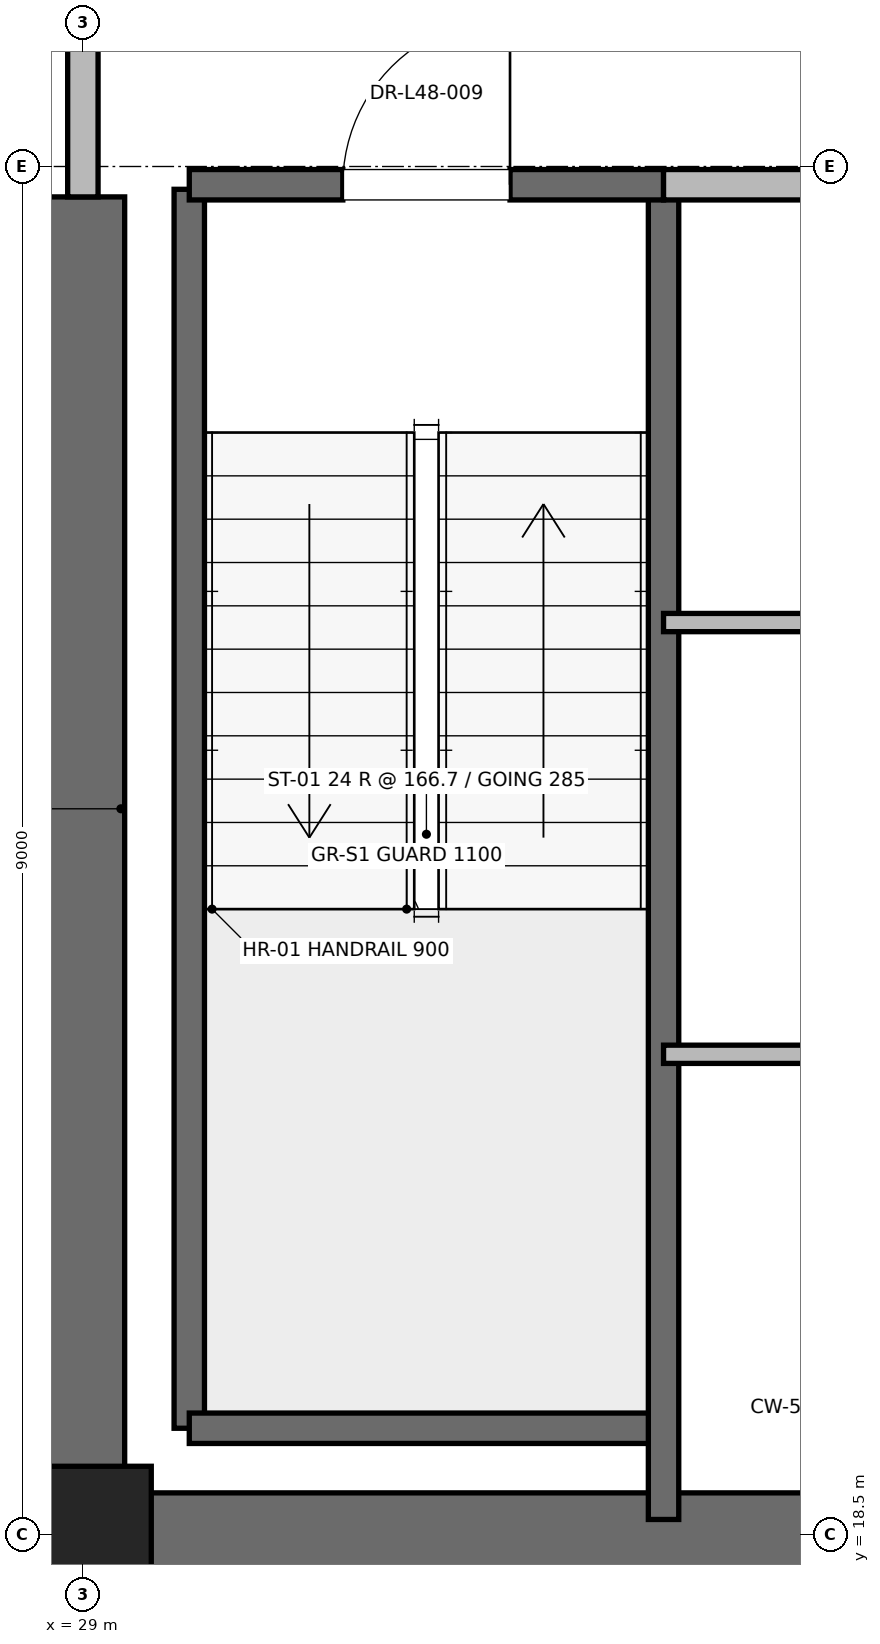
"""IFC4 building model, lengths in metres.
Left out: names, types, materials, properties, quantities, classifications, styles, units other than length and angle.
Written with IfcOpenShell. Run it as: python <this file> out.ifc"""

import sys

from ifc_helpers import new_model, si_unit, direction, frame, frame_2d, origin, origin_2d, place, context, subcontext, project, spatial, rectangle, extrude, element, fill, save


model = new_model("IFC4")
c1 = context("Model", 3, precision=1e-05, world=origin(), true_north=direction((0.0, 1.0)))
c2 = subcontext(c1, "Body", "Model", "MODEL_VIEW")
j1 = project(units=[si_unit("LENGTHUNIT", "METRE"), si_unit("PLANEANGLEUNIT", "RADIAN")], contexts=[c1])
p1 = place(None, origin())
s1 = spatial("IfcSite", under=j1, at=p1, CompositionType="ELEMENT")
p2 = place(p1, origin())
s2 = spatial("IfcBuilding", under=s1, at=p2, CompositionType="ELEMENT")
p3 = place(p2, frame((0.0, 0.0, 209.2)))
s3 = spatial("IfcBuildingStorey", under=s2, at=p3, CompositionType="ELEMENT", Elevation=209.2)
p4 = place(p3, frame((29.0, 18.5, 0.0), z_axis=(0.0, 0.0, 1.0), x_axis=(1.0, 0.0, 0.0)))
e1 = element("IfcColumn", 1, at=p4, inside=s3, PredefinedType="PILASTER", context=c2, shape_type="SweptSolid", body=[
    extrude(rectangle(XDim=0.9, YDim=0.9, at=origin_2d()), origin(), (0.0, 0.0, 1.0), 4.0),
])
p5 = place(p3, frame((29.0, 18.5, 0.0), z_axis=(0.0, 0.0, 1.0), x_axis=(1.0, 0.0, 0.0)))
e2 = element("IfcWall", 2, at=p5, inside=s3, PredefinedType="SHEAR", context=c2, shape_type="SweptSolid", body=[
    extrude(rectangle(XDim=9.2, YDim=0.55, at=frame_2d((4.6, 0.0))), origin(), (0.0, 0.0, 1.0), 3.775),
])
p6 = place(p3, frame((29.0, 18.5, 0.0), z_axis=(0.0, 0.0, 1.0), x_axis=(0.0, 1.0, 0.0)))
e3 = element("IfcWall", 3, at=p6, inside=s3, PredefinedType="SHEAR", context=c2, shape_type="SweptSolid", body=[
    extrude(rectangle(XDim=8.8, YDim=0.55, at=frame_2d((4.4, 0.0))), origin(), (0.0, 0.0, 1.0), 3.775),
])
p7 = place(p3, frame((29.7, 19.2, 0.0), z_axis=(0.0, 0.0, 1.0), x_axis=(0.0, 1.0, 0.0)))
e4 = element("IfcWall", 4, at=p7, inside=s3, PredefinedType="SOLIDWALL", context=c2, shape_type="SweptSolid", body=[
    extrude(rectangle(XDim=8.15, YDim=0.2, at=frame_2d((4.075, 0.0))), origin(), (0.0, 0.0, 1.0), 3.775),
])
p8 = place(p3, frame((29.7, 19.2, 0.0), z_axis=(0.0, 0.0, 1.0), x_axis=(1.0, 0.0, 0.0)))
e5 = element("IfcWall", 5, at=p8, inside=s3, PredefinedType="SOLIDWALL", context=c2, shape_type="SweptSolid", body=[
    extrude(rectangle(XDim=3.12, YDim=0.2, at=frame_2d((1.56, 0.0))), origin(), (0.0, 0.0, 1.0), 3.775),
])
p9 = place(p3, frame((32.82, 18.6, 0.0), z_axis=(0.0, 0.0, 1.0), x_axis=(0.0, 1.0, 0.0)))
e6 = element("IfcWall", 6, at=p9, inside=s3, PredefinedType="SOLIDWALL", context=c2, shape_type="SweptSolid", body=[
    extrude(rectangle(XDim=8.78, YDim=0.2, at=frame_2d((4.39, 0.0))), origin(), (0.0, 0.0, 1.0), 3.775),
])
p10 = place(p3, frame((29.7, 27.38, 0.0), z_axis=(0.0, 0.0, 1.0), x_axis=(1.0, 0.0, 0.0)))
e7 = element("IfcWall", 7, at=p10, inside=s3, PredefinedType="SOLIDWALL", context=c2, shape_type="SweptSolid", body=[
    extrude(rectangle(XDim=3.12, YDim=0.2, at=frame_2d((1.56, 0.0))), origin(), (0.0, 0.0, 1.0), 3.775),
])
p11 = place(p10, frame((1.01, 0.0, 0.0)))
e8 = element("IfcOpeningElement", 8, at=p11, cuts=e7, PredefinedType="OPENING", context=c2, shape_type="SweptSolid", body=[
    extrude(rectangle(XDim=1.1, YDim=2.15, at=frame_2d((0.55, 1.075))), frame((0.0, 0.1, 0.0), z_axis=(0.0, -1.0, 0.0), x_axis=(1.0, 0.0, 0.0)), (0.0, 0.0, 1.0), 0.2),
])
p12 = place(p3, frame((29.0, 27.3, 0.0), z_axis=(0.0, 0.0, 1.0), x_axis=(0.0, 1.0, 0.0)))
e9 = element("IfcWall", 9, at=p12, inside=s3, PredefinedType="PARTITIONING", context=c2, shape_type="SweptSolid", body=[
    extrude(rectangle(XDim=3.4, YDim=0.2, at=frame_2d((1.7, 0.0))), origin(), (0.0, 0.0, 1.0), 2.755),
])
p13 = place(p12, frame((1.125, 0.0, 0.0)))
e10 = element("IfcOpeningElement", 10, at=p13, cuts=e9, PredefinedType="OPENING", context=c2, shape_type="SweptSolid", body=[
    extrude(rectangle(XDim=1.15, YDim=2.2, at=frame_2d((0.575, 1.1))), frame((0.0, 0.1, 0.0), z_axis=(0.0, -1.0, 0.0), x_axis=(1.0, 0.0, 0.0)), (0.0, 0.0, 1.0), 0.2),
])
p14 = place(p3, frame((32.82, 27.38, 0.0), z_axis=(0.0, 0.0, 1.0), x_axis=(1.0, 0.0, 0.0)))
e11 = element("IfcWall", 11, at=p14, inside=s3, PredefinedType="PARTITIONING", context=c2, shape_type="SweptSolid", body=[
    extrude(rectangle(XDim=5.62, YDim=0.2, at=frame_2d((2.81, 0.0))), origin(), (0.0, 0.0, 1.0), 3.775),
])
for number, where, z_axis, x_axis in (
    (12, (32.82, 21.66, 0.0), (0.0, 0.0, 1.0), (1.0, 0.0, 0.0)),
    (13, (32.82, 24.5, 0.0), (0.0, 0.0, 1.0), (1.0, 0.0, 0.0)),
):
    element("IfcWall", number, at=place(p3, frame(where, z_axis=z_axis, x_axis=x_axis)), inside=s3, PredefinedType="PARTITIONING", context=c2, shape_type="SweptSolid", body=[
        extrude(rectangle(XDim=5.23, YDim=0.12, at=frame_2d((2.615, 0.0))), origin(), (0.0, 0.0, 1.0), 2.85),
    ])
p15 = place(p11, origin())
e14 = element("IfcDoor", 14, at=p15, inside=s3, OperationType="SINGLE_SWING_RIGHT", PredefinedType="DOOR", context=c2, shape_type="SweptSolid", body=[
    extrude(rectangle(XDim=1.1, YDim=2.15, at=frame_2d((0.55, 1.075))), frame((0.0, 0.025, 0.0), z_axis=(0.0, -1.0, 0.0), x_axis=(1.0, 0.0, 0.0)), (0.0, 0.0, 1.0), 0.05),
])
fill(e8, e14)
save(model, sys.argv[1])
